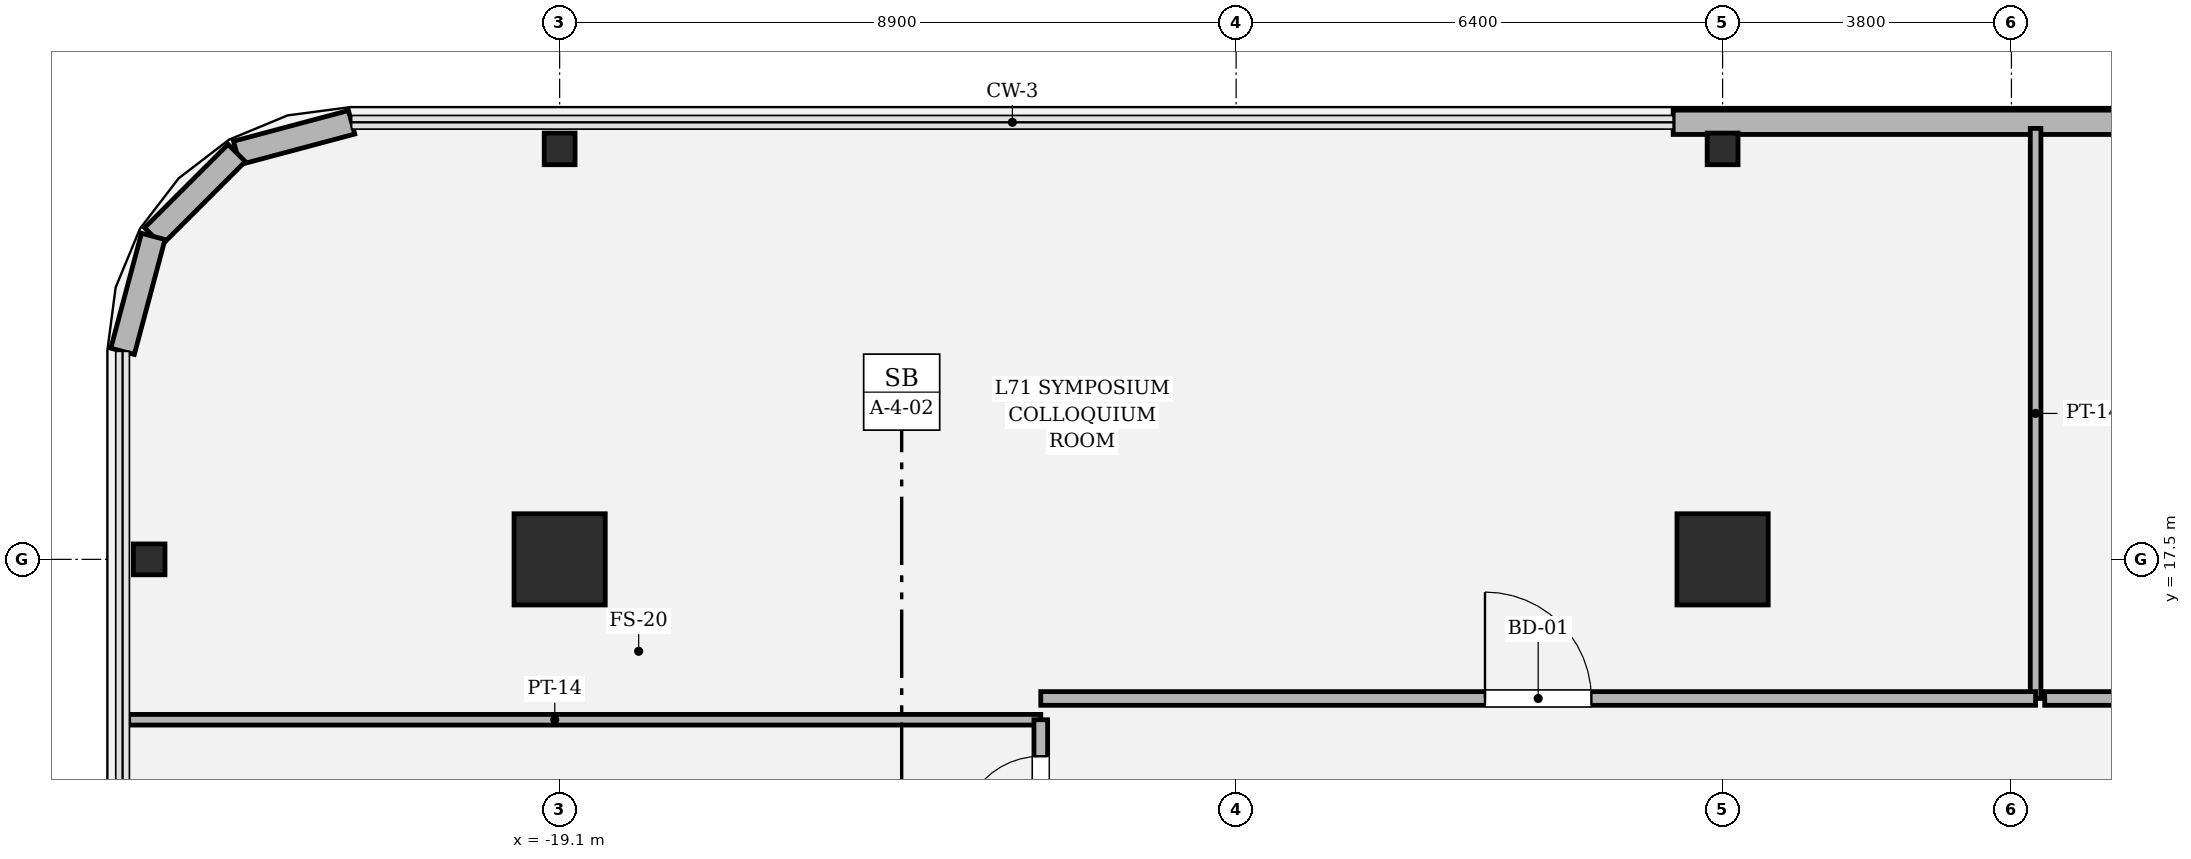
"""IFC4 building model, lengths in metres.
Left out: names, types, materials, properties, quantities, classifications, styles, units other than length and angle.
Written with IfcOpenShell. Run it as: python <this file> out.ifc"""

import sys

from ifc_helpers import new_model, si_unit, direction, frame, frame_2d, origin, origin_2d, place, context, subcontext, project, spatial, rectangle, hollow_rectangle, i_section, extrude, element, fill, save


model = new_model("IFC4")
c1 = context("Model", 3, precision=1e-05, world=origin(), true_north=direction((0.0, 1.0)))
c2 = subcontext(c1, "Body", "Model", "MODEL_VIEW")
j1 = project(units=[si_unit("LENGTHUNIT", "METRE"), si_unit("PLANEANGLEUNIT", "RADIAN")], contexts=[c1])
p1 = place(None, origin())
s1 = spatial("IfcSite", under=j1, at=p1, CompositionType="ELEMENT")
p2 = place(p1, origin())
s2 = spatial("IfcBuilding", under=s1, at=p2, CompositionType="ELEMENT")
p3 = place(p2, frame((0.0, 0.0, 300.6)))
s3 = spatial("IfcBuildingStorey", under=s2, at=p3, CompositionType="ELEMENT", Elevation=300.6)
for number, where, z_axis, x_axis in (
    (1, (-3.8, 17.5, 0.0), (0.0, 0.0, 1.0), (1.0, 0.0, 0.0)),
    (2, (-19.1, 17.5, 0.0), (0.0, 0.0, 1.0), (1.0, 0.0, 0.0)),
):
    element("IfcColumn", number, at=place(p3, frame(where, z_axis=z_axis, x_axis=x_axis)), inside=s3, PredefinedType="COLUMN", context=c2, shape_type="SweptSolid", body=[
        extrude(hollow_rectangle(XDim=1.2, YDim=1.2, WallThickness=0.035, at=origin_2d()), origin(), (0.0, 0.0, 1.0), 4.2),
    ])
for number, where, z_axis, x_axis in (
    (3, (-19.1, 22.9, 0.0), (0.0, 0.0, 1.0), (1.0, 0.0, 0.0)),
    (4, (-3.8, 22.9, 0.0), (0.0, 0.0, 1.0), (1.0, 0.0, 0.0)),
    (5, (-24.5, 17.5, 0.0), (0.0, 0.0, 1.0), (0.0, 1.0, 0.0)),
):
    element("IfcColumn", number, at=place(p3, frame(where, z_axis=z_axis, x_axis=x_axis)), inside=s3, PredefinedType="COLUMN", context=c2, shape_type="SweptSolid", body=[
        extrude(i_section(OverallWidth=0.406, OverallDepth=0.416, WebThickness=0.029, FlangeThickness=0.048, FilletRadius=0.018, at=origin_2d()), origin(), (0.0, 0.0, 1.0), 4.198),
    ])
p4 = place(p3, frame((4.45, 23.25, 0.0), z_axis=(0.0, 0.0, 1.0), x_axis=(-1.0, 0.0, 0.0)))
e6 = element("IfcWall", 6, at=p4, inside=s3, PredefinedType="SOLIDWALL", context=c2, shape_type="SweptSolid", body=[
    extrude(rectangle(XDim=8.9, YDim=0.32, at=frame_2d((4.45, 0.0))), origin(), (0.0, 0.0, 1.0), 2.714),
])
p5 = place(p3, frame((-21.837, 23.25, 0.0), z_axis=(0.0, 0.0, 1.0), x_axis=(-0.966224582397, -0.257701486942, 0.0)))
e7 = element("IfcWall", 7, at=p5, inside=s3, PredefinedType="SOLIDWALL", context=c2, shape_type="SweptSolid", body=[
    extrude(rectangle(XDim=1.565, YDim=0.32, at=frame_2d((0.783, 0.0))), origin(), (0.0, 0.0, 1.0), 4.0),
])
p6 = place(p3, frame((-23.349, 22.847, 0.0), z_axis=(0.0, 0.0, 1.0), x_axis=(-0.707028130747, -0.707185422879, 0.0)))
e8 = element("IfcWall", 8, at=p6, inside=s3, PredefinedType="SOLIDWALL", context=c2, shape_type="SweptSolid", body=[
    extrude(rectangle(XDim=1.552, YDim=0.32, at=frame_2d((0.776, 0.0))), origin(), (0.0, 0.0, 1.0), 4.0),
])
p7 = place(p3, frame((-24.447, 21.749, 0.0), z_axis=(0.0, 0.0, 1.0), x_axis=(-0.257847112249, -0.966185730957, 0.0)))
e9 = element("IfcWall", 9, at=p7, inside=s3, PredefinedType="SOLIDWALL", context=c2, shape_type="SweptSolid", body=[
    extrude(rectangle(XDim=1.565, YDim=0.32, at=frame_2d((0.783, 0.0))), origin(), (0.0, 0.0, 1.0), 4.0),
])
p8 = place(p3, frame((-24.77, 15.39, 0.0), z_axis=(0.0, 0.0, 1.0), x_axis=(1.0, 0.0, 0.0)))
e10 = element("IfcWall", 10, at=p8, inside=s3, PredefinedType="PARTITIONING", context=c2, shape_type="SweptSolid", body=[
    extrude(rectangle(XDim=12.0, YDim=0.14, at=frame_2d((6.0, 0.0))), origin(), (0.0, 0.0, 1.0), 2.714),
])
p9 = place(p3, frame((-12.77, 15.39, 0.0), z_axis=(0.0, 0.0, 1.0), x_axis=(0.0, -1.0, 0.0)))
e11 = element("IfcWall", 11, at=p9, inside=s3, PredefinedType="PARTITIONING", context=c2, shape_type="SweptSolid", body=[
    extrude(rectangle(XDim=2.01, YDim=0.18, at=frame_2d((1.005, 0.0))), origin(), (0.0, 0.0, 1.0), 3.634),
])
p10 = place(p9, frame((0.48, 0.0, 0.0)))
e12 = element("IfcOpeningElement", 12, at=p10, cuts=e11, PredefinedType="OPENING", context=c2, shape_type="SweptSolid", body=[
    extrude(rectangle(XDim=1.05, YDim=2.2, at=frame_2d((0.525, 1.1))), frame((0.0, 0.1, 0.0), z_axis=(0.0, -1.0, 0.0), x_axis=(1.0, 0.0, 0.0)), (0.0, 0.0, 1.0), 0.2),
])
p11 = place(p3, frame((0.318, 23.17, 0.0), z_axis=(0.0, 0.0, 1.0), x_axis=(0.0, -1.0, 0.0)))
e13 = element("IfcWall", 13, at=p11, inside=s3, PredefinedType="PARTITIONING", context=c2, shape_type="SweptSolid", body=[
    extrude(rectangle(XDim=7.5, YDim=0.14, at=frame_2d((3.75, 0.0))), origin(), (0.0, 0.0, 1.0), 2.714),
])
p12 = place(p3, frame((0.318, 15.67, 0.0), z_axis=(0.0, 0.0, 1.0), x_axis=(-1.0, 0.0, 0.0)))
e14 = element("IfcWall", 14, at=p12, inside=s3, PredefinedType="PARTITIONING", context=c2, shape_type="SweptSolid", body=[
    extrude(rectangle(XDim=13.088, YDim=0.18, at=frame_2d((6.544, 0.0))), origin(), (0.0, 0.0, 1.0), 3.394),
])
p13 = place(p12, frame((5.844, 0.0, 0.0)))
e15 = element("IfcOpeningElement", 15, at=p13, cuts=e14, PredefinedType="OPENING", context=c2, shape_type="SweptSolid", body=[
    extrude(rectangle(XDim=1.4, YDim=2.25, at=frame_2d((0.7, 1.125))), frame((0.0, 0.1, 0.0), z_axis=(0.0, -1.0, 0.0), x_axis=(1.0, 0.0, 0.0)), (0.0, 0.0, 1.0), 0.2),
])
p14 = place(p3, frame((14.42, 15.67, 0.0), z_axis=(0.0, 0.0, 1.0), x_axis=(-1.0, 0.0, 0.0)))
e16 = element("IfcWall", 16, at=p14, inside=s3, PredefinedType="PARTITIONING", context=c2, shape_type="SweptSolid", body=[
    extrude(rectangle(XDim=13.982, YDim=0.18, at=frame_2d((6.991, 0.0))), origin(), (0.0, 0.0, 1.0), 3.394),
])
p15 = place(p14, frame((6.291, 0.0, 0.0)))
e17 = element("IfcOpeningElement", 17, at=p15, cuts=e16, PredefinedType="OPENING", context=c2, shape_type="SweptSolid", body=[
    extrude(rectangle(XDim=1.4, YDim=2.25, at=frame_2d((0.7, 1.125))), frame((0.0, 0.1, 0.0), z_axis=(0.0, -1.0, 0.0), x_axis=(1.0, 0.0, 0.0)), (0.0, 0.0, 1.0), 0.2),
])
p16 = place(p10, origin())
e18 = element("IfcDoor", 18, at=p16, inside=s3, OperationType="SINGLE_SWING_RIGHT", PredefinedType="DOOR", context=c2, shape_type="SweptSolid", body=[
    extrude(rectangle(XDim=1.05, YDim=2.2, at=frame_2d((0.525, 1.1))), frame((0.0, 0.025, 0.0), z_axis=(0.0, -1.0, 0.0), x_axis=(1.0, 0.0, 0.0)), (0.0, 0.0, 1.0), 0.05),
])
fill(e12, e18)
p17 = place(p13, origin())
e19 = element("IfcDoor", 19, at=p17, inside=s3, OperationType="SINGLE_SWING_RIGHT", PredefinedType="DOOR", context=c2, shape_type="SweptSolid", body=[
    extrude(rectangle(XDim=1.4, YDim=2.25, at=frame_2d((0.7, 1.125))), frame((0.0, 0.025, 0.0), z_axis=(0.0, -1.0, 0.0), x_axis=(1.0, 0.0, 0.0)), (0.0, 0.0, 1.0), 0.05),
])
fill(e15, e19)
save(model, sys.argv[1])
